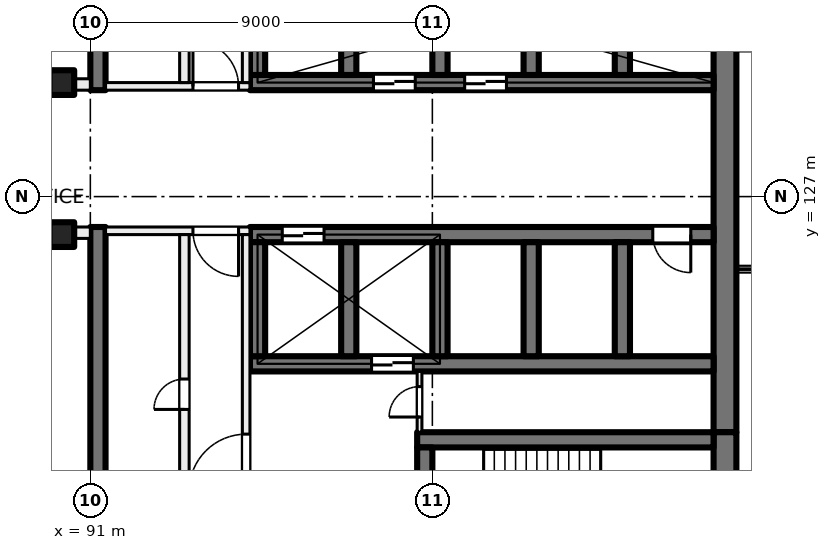
"""IFC4 building model, lengths in metres.
Left out: names, types, materials, properties, quantities, classifications, styles, units other than length and angle.
Written with IfcOpenShell. Run it as: python <this file> out.ifc"""

import sys

from ifc_helpers import new_model, si_unit, direction, frame, frame_2d, origin, origin_2d, place, context, subcontext, project, spatial, rectangle, extrude, element, fill, save


model = new_model("IFC4")
c1 = context("Model", 3, precision=1e-05, world=origin(), true_north=direction((0.0, 1.0)))
c2 = subcontext(c1, "Body", "Model", "MODEL_VIEW")
j1 = project(units=[si_unit("LENGTHUNIT", "METRE"), si_unit("PLANEANGLEUNIT", "RADIAN")], contexts=[c1])
p1 = place(None, origin())
s1 = spatial("IfcSite", under=j1, at=p1, CompositionType="ELEMENT")
p2 = place(p1, origin())
s2 = spatial("IfcBuilding", under=s1, at=p2, CompositionType="ELEMENT")
p3 = place(p2, frame((0.0, 0.0, 117.0)))
s3 = spatial("IfcBuildingStorey", under=s2, at=p3, CompositionType="ELEMENT", Elevation=117.0)
for number, where, z_axis, x_axis in (
    (1, (90.25, 130.0, 0.0), (0.0, 0.0, 1.0), (1.0, 0.0, 0.0)),
    (2, (90.25, 126.0, 0.0), (0.0, 0.0, 1.0), (1.0, 0.0, 0.0)),
):
    element("IfcColumn", number, at=place(p3, frame(where, z_axis=z_axis, x_axis=x_axis)), inside=s3, PredefinedType="COLUMN", context=c2, shape_type="SweptSolid", body=[
        extrude(rectangle(XDim=0.65, YDim=0.65, at=origin_2d()), origin(), (0.0, 0.0, 1.0), 4.0),
    ])
p4 = place(p3, frame((107.7, 135.2, 0.0), z_axis=(0.0, 0.0, 1.0), x_axis=(0.0, -1.0, 0.0)))
e3 = element("IfcWall", 3, at=p4, inside=s3, PredefinedType="SHEAR", context=c2, shape_type="SweptSolid", body=[
    extrude(rectangle(XDim=14.4, YDim=0.6, at=frame_2d((7.2, 0.0))), origin(), (0.0, 0.0, 1.0), 4.0),
])
p5 = place(p3, frame((107.7, 120.8, 0.0), z_axis=(0.0, 0.0, 1.0), x_axis=(0.0, -1.0, 0.0)))
e4 = element("IfcWall", 4, at=p5, inside=s3, PredefinedType="SHEAR", context=c2, shape_type="SweptSolid", body=[
    extrude(rectangle(XDim=3.8, YDim=0.6, at=frame_2d((1.9, 0.0))), origin(), (0.0, 0.0, 1.0), 4.0),
])
p6 = place(p3, frame((107.4, 120.6, 0.0), z_axis=(0.0, 0.0, 1.0), x_axis=(-1.0, 0.0, 0.0)))
e5 = element("IfcWall", 5, at=p6, inside=s3, PredefinedType="SHEAR", context=c2, shape_type="SweptSolid", body=[
    extrude(rectangle(XDim=7.8, YDim=0.4, at=frame_2d((3.9, 0.0))), origin(), (0.0, 0.0, 1.0), 4.0),
])
p7 = place(p3, frame((99.8, 120.4, 0.0), z_axis=(0.0, 0.0, 1.0), x_axis=(0.0, -1.0, 0.0)))
e6 = element("IfcWall", 6, at=p7, inside=s3, PredefinedType="SHEAR", context=c2, shape_type="SweptSolid", body=[
    extrude(rectangle(XDim=2.8, YDim=0.4, at=frame_2d((1.4, 0.0))), origin(), (0.0, 0.0, 1.0), 4.0),
])
p8 = place(p7, frame((0.9, 0.0, 0.0)))
e7 = element("IfcOpeningElement", 7, at=p8, cuts=e6, PredefinedType="OPENING", context=c2, shape_type="SweptSolid", body=[
    extrude(rectangle(XDim=1.0, YDim=2.1, at=frame_2d((0.5, 1.05))), frame((0.0, 0.21, 0.0), z_axis=(0.0, -1.0, 0.0), x_axis=(1.0, 0.0, 0.0)), (0.0, 0.0, 1.0), 0.42),
])
p9 = place(p3, frame((107.4, 130.0, 0.0), z_axis=(0.0, 0.0, 1.0), x_axis=(-1.0, 0.0, 0.0)))
e8 = element("IfcWall", 8, at=p9, inside=s3, PredefinedType="SHEAR", context=c2, shape_type="SweptSolid", body=[
    extrude(rectangle(XDim=12.2, YDim=0.4, at=frame_2d((6.1, 0.0))), origin(), (0.0, 0.0, 1.0), 4.0),
])
p10 = place(p9, frame((5.45, 0.0, 0.0)))
e9 = element("IfcOpeningElement", 9, at=p10, cuts=e8, PredefinedType="OPENING", context=c2, shape_type="SweptSolid", body=[
    extrude(rectangle(XDim=1.1, YDim=2.1, at=frame_2d((0.55, 1.05))), frame((0.0, 0.21, 0.0), z_axis=(0.0, -1.0, 0.0), x_axis=(1.0, 0.0, 0.0)), (0.0, 0.0, 1.0), 0.42),
])
p11 = place(p9, frame((7.85, 0.0, 0.0)))
e10 = element("IfcOpeningElement", 10, at=p11, cuts=e8, PredefinedType="OPENING", context=c2, shape_type="SweptSolid", body=[
    extrude(rectangle(XDim=1.1, YDim=2.1, at=frame_2d((0.55, 1.05))), frame((0.0, 0.21, 0.0), z_axis=(0.0, -1.0, 0.0), x_axis=(1.0, 0.0, 0.0)), (0.0, 0.0, 1.0), 0.42),
])
for number, where, z_axis, x_axis in (
    (11, (105.0, 133.2, 0.0), (0.0, 0.0, 1.0), (0.0, -1.0, 0.0)),
    (12, (102.6, 133.2, 0.0), (0.0, 0.0, 1.0), (0.0, -1.0, 0.0)),
    (13, (100.2, 133.2, 0.0), (0.0, 0.0, 1.0), (0.0, -1.0, 0.0)),
    (14, (97.8, 133.2, 0.0), (0.0, 0.0, 1.0), (0.0, -1.0, 0.0)),
    (15, (95.4, 133.2, 0.0), (0.0, 0.0, 1.0), (0.0, -1.0, 0.0)),
):
    element("IfcWall", number, at=place(p3, frame(where, z_axis=z_axis, x_axis=x_axis)), inside=s3, PredefinedType="SHEAR", context=c2, shape_type="SweptSolid", body=[
        extrude(rectangle(XDim=3.0, YDim=0.4, at=frame_2d((1.5, 0.0))), origin(), (0.0, 0.0, 1.0), 4.0),
    ])
p12 = place(p3, frame((107.4, 126.0, 0.0), z_axis=(0.0, 0.0, 1.0), x_axis=(-1.0, 0.0, 0.0)))
e16 = element("IfcWall", 16, at=p12, inside=s3, PredefinedType="SHEAR", context=c2, shape_type="SweptSolid", body=[
    extrude(rectangle(XDim=12.2, YDim=0.4, at=frame_2d((6.1, 0.0))), origin(), (0.0, 0.0, 1.0), 4.0),
])
p13 = place(p12, frame((10.25, 0.0, 0.0)))
e17 = element("IfcOpeningElement", 17, at=p13, cuts=e16, PredefinedType="OPENING", context=c2, shape_type="SweptSolid", body=[
    extrude(rectangle(XDim=1.1, YDim=2.1, at=frame_2d((0.55, 1.05))), frame((0.0, 0.21, 0.0), z_axis=(0.0, -1.0, 0.0), x_axis=(1.0, 0.0, 0.0)), (0.0, 0.0, 1.0), 0.42),
])
p14 = place(p12, frame((0.6, 0.0, 0.0)))
e18 = element("IfcOpeningElement", 18, at=p14, cuts=e16, PredefinedType="OPENING", context=c2, shape_type="SweptSolid", body=[
    extrude(rectangle(XDim=1.0, YDim=2.1, at=frame_2d((0.5, 1.05))), frame((0.0, 0.21, 0.0), z_axis=(0.0, -1.0, 0.0), x_axis=(1.0, 0.0, 0.0)), (0.0, 0.0, 1.0), 0.42),
])
p15 = place(p3, frame((107.4, 122.6, 0.0), z_axis=(0.0, 0.0, 1.0), x_axis=(-1.0, 0.0, 0.0)))
e19 = element("IfcWall", 19, at=p15, inside=s3, PredefinedType="SHEAR", context=c2, shape_type="SweptSolid", body=[
    extrude(rectangle(XDim=12.2, YDim=0.4, at=frame_2d((6.1, 0.0))), origin(), (0.0, 0.0, 1.0), 4.0),
])
p16 = place(p15, frame((7.9, 0.0, 0.0)))
e20 = element("IfcOpeningElement", 20, at=p16, cuts=e19, PredefinedType="OPENING", context=c2, shape_type="SweptSolid", body=[
    extrude(rectangle(XDim=1.1, YDim=2.1, at=frame_2d((0.55, 1.05))), frame((0.0, 0.21, 0.0), z_axis=(0.0, -1.0, 0.0), x_axis=(1.0, 0.0, 0.0)), (0.0, 0.0, 1.0), 0.42),
])
for number, where, z_axis, x_axis in (
    (21, (105.0, 125.8, 0.0), (0.0, 0.0, 1.0), (0.0, -1.0, 0.0)),
    (22, (102.6, 125.8, 0.0), (0.0, 0.0, 1.0), (0.0, -1.0, 0.0)),
    (23, (100.2, 125.8, 0.0), (0.0, 0.0, 1.0), (0.0, -1.0, 0.0)),
    (24, (97.8, 125.8, 0.0), (0.0, 0.0, 1.0), (0.0, -1.0, 0.0)),
    (25, (95.4, 125.8, 0.0), (0.0, 0.0, 1.0), (0.0, -1.0, 0.0)),
):
    element("IfcWall", number, at=place(p3, frame(where, z_axis=z_axis, x_axis=x_axis)), inside=s3, PredefinedType="SHEAR", context=c2, shape_type="SweptSolid", body=[
        extrude(rectangle(XDim=3.0, YDim=0.4, at=frame_2d((1.5, 0.0))), origin(), (0.0, 0.0, 1.0), 4.0),
    ])
for number, where, z_axis, x_axis in (
    (26, (91.2, 138.4, 0.0), (0.0, 0.0, 1.0), (0.0, -1.0, 0.0)),
    (27, (91.2, 126.2, 0.0), (0.0, 0.0, 1.0), (0.0, -1.0, 0.0)),
):
    element("IfcWall", number, at=place(p3, frame(where, z_axis=z_axis, x_axis=x_axis)), inside=s3, PredefinedType="SHEAR", context=c2, shape_type="SweptSolid", body=[
        extrude(rectangle(XDim=8.6, YDim=0.4, at=frame_2d((4.3, 0.0))), origin(), (0.0, 0.0, 1.0), 4.0),
    ])
p17 = place(p3, frame((95.2, 126.1, 0.0), z_axis=(0.0, 0.0, 1.0), x_axis=(-1.0, 0.0, 0.0)))
e28 = element("IfcWall", 28, at=p17, inside=s3, PredefinedType="PARTITIONING", context=c2, shape_type="SweptSolid", body=[
    extrude(rectangle(XDim=3.8, YDim=0.2, at=frame_2d((1.9, 0.0))), origin(), (0.0, 0.0, 1.0), 3.625),
])
p18 = place(p17, frame((0.3, 0.0, 0.0)))
e29 = element("IfcOpeningElement", 29, at=p18, cuts=e28, PredefinedType="OPENING", context=c2, shape_type="SweptSolid", body=[
    extrude(rectangle(XDim=1.2, YDim=2.1, at=frame_2d((0.6, 1.05))), frame((0.0, 0.11, 0.0), z_axis=(0.0, -1.0, 0.0), x_axis=(1.0, 0.0, 0.0)), (0.0, 0.0, 1.0), 0.22),
])
p19 = place(p3, frame((95.1, 117.6, 0.0), z_axis=(0.0, 0.0, 1.0), x_axis=(0.0, 1.0, 0.0)))
e30 = element("IfcWall", 30, at=p19, inside=s3, PredefinedType="PARTITIONING", context=c2, shape_type="SweptSolid", body=[
    extrude(rectangle(XDim=8.4, YDim=0.2, at=frame_2d((4.2, 0.0))), origin(), (0.0, 0.0, 1.0), 3.625),
])
p20 = place(p19, frame((1.65, 0.0, 0.0)))
e31 = element("IfcOpeningElement", 31, at=p20, cuts=e30, PredefinedType="OPENING", context=c2, shape_type="SweptSolid", body=[
    extrude(rectangle(XDim=1.5, YDim=2.1, at=frame_2d((0.75, 1.05))), frame((0.0, 0.11, 0.0), z_axis=(0.0, -1.0, 0.0), x_axis=(1.0, 0.0, 0.0)), (0.0, 0.0, 1.0), 0.22),
])
p21 = place(p3, frame((93.475, 117.6, 0.0), z_axis=(0.0, 0.0, 1.0), x_axis=(0.0, 1.0, 0.0)))
e32 = element("IfcWall", 32, at=p21, inside=s3, PredefinedType="PARTITIONING", context=c2, shape_type="SweptSolid", body=[
    extrude(rectangle(XDim=8.4, YDim=0.25, at=frame_2d((4.2, 0.0))), origin(), (0.0, 0.0, 1.0), 3.625),
])
p22 = place(p21, frame((3.8, 0.0, 0.0)))
e33 = element("IfcOpeningElement", 33, at=p22, cuts=e32, PredefinedType="OPENING", context=c2, shape_type="SweptSolid", body=[
    extrude(rectangle(XDim=0.8, YDim=2.1, at=frame_2d((0.4, 1.05))), frame((0.0, 0.135, 0.0), z_axis=(0.0, -1.0, 0.0), x_axis=(1.0, 0.0, 0.0)), (0.0, 0.0, 1.0), 0.27),
])
p23 = place(p3, frame((99.663, 120.8, 0.0), z_axis=(0.0, 0.0, 1.0), x_axis=(0.0, 1.0, 0.0)))
e34 = element("IfcWall", 34, at=p23, inside=s3, PredefinedType="PARTITIONING", context=c2, shape_type="SweptSolid", body=[
    extrude(rectangle(XDim=1.6, YDim=0.125, at=frame_2d((0.8, 0.0))), origin(), (0.0, 0.0, 1.0), 3.625),
])
p24 = place(p23, frame((0.4, 0.0, 0.0)))
e35 = element("IfcOpeningElement", 35, at=p24, cuts=e34, PredefinedType="OPENING", context=c2, shape_type="SweptSolid", body=[
    extrude(rectangle(XDim=0.8, YDim=2.1, at=frame_2d((0.4, 1.05))), frame((0.0, 0.073, 0.0), z_axis=(0.0, -1.0, 0.0), x_axis=(1.0, 0.0, 0.0)), (0.0, 0.0, 1.0), 0.145),
])
p25 = place(p3, frame((91.4, 129.9, 0.0), z_axis=(0.0, 0.0, 1.0), x_axis=(1.0, 0.0, 0.0)))
e36 = element("IfcWall", 36, at=p25, inside=s3, PredefinedType="PARTITIONING", context=c2, shape_type="SweptSolid", body=[
    extrude(rectangle(XDim=3.8, YDim=0.2, at=frame_2d((1.9, 0.0))), origin(), (0.0, 0.0, 1.0), 3.625),
])
p26 = place(p25, frame((2.3, 0.0, 0.0)))
e37 = element("IfcOpeningElement", 37, at=p26, cuts=e36, PredefinedType="OPENING", context=c2, shape_type="SweptSolid", body=[
    extrude(rectangle(XDim=1.2, YDim=2.1, at=frame_2d((0.6, 1.05))), frame((0.0, 0.11, 0.0), z_axis=(0.0, -1.0, 0.0), x_axis=(1.0, 0.0, 0.0)), (0.0, 0.0, 1.0), 0.22),
])
p27 = place(p3, frame((95.1, 130.0, 0.0), z_axis=(0.0, 0.0, 1.0), x_axis=(0.0, 1.0, 0.0)))
e38 = element("IfcWall", 38, at=p27, inside=s3, PredefinedType="PARTITIONING", context=c2, shape_type="SweptSolid", body=[
    extrude(rectangle(XDim=8.4, YDim=0.2, at=frame_2d((4.2, 0.0))), origin(), (0.0, 0.0, 1.0), 3.625),
])
p28 = place(p27, frame((5.25, 0.0, 0.0)))
e39 = element("IfcOpeningElement", 39, at=p28, cuts=e38, PredefinedType="OPENING", context=c2, shape_type="SweptSolid", body=[
    extrude(rectangle(XDim=1.5, YDim=2.1, at=frame_2d((0.75, 1.05))), frame((0.0, 0.11, 0.0), z_axis=(0.0, -1.0, 0.0), x_axis=(1.0, 0.0, 0.0)), (0.0, 0.0, 1.0), 0.22),
])
p29 = place(p3, frame((93.475, 130.0, 0.0), z_axis=(0.0, 0.0, 1.0), x_axis=(0.0, 1.0, 0.0)))
e40 = element("IfcWall", 40, at=p29, inside=s3, PredefinedType="PARTITIONING", context=c2, shape_type="SweptSolid", body=[
    extrude(rectangle(XDim=8.4, YDim=0.25, at=frame_2d((4.2, 0.0))), origin(), (0.0, 0.0, 1.0), 3.625),
])
p30 = place(p29, frame((0.875, 0.0, 0.0)))
e41 = element("IfcOpeningElement", 41, at=p30, cuts=e40, PredefinedType="OPENING", context=c2, shape_type="SweptSolid", body=[
    extrude(rectangle(XDim=1.0, YDim=2.1, at=frame_2d((0.5, 1.05))), frame((0.0, 0.135, 0.0), z_axis=(0.0, -1.0, 0.0), x_axis=(1.0, 0.0, 0.0)), (0.0, 0.0, 1.0), 0.27),
])
p31 = place(p29, frame((5.225, 0.0, 0.0)))
e42 = element("IfcOpeningElement", 42, at=p31, cuts=e40, PredefinedType="OPENING", context=c2, shape_type="SweptSolid", body=[
    extrude(rectangle(XDim=0.8, YDim=2.1, at=frame_2d((0.4, 1.05))), frame((0.0, 0.135, 0.0), z_axis=(0.0, -1.0, 0.0), x_axis=(1.0, 0.0, 0.0)), (0.0, 0.0, 1.0), 0.27),
])
p32 = place(p3, frame((72.5, 129.95, 0.0), z_axis=(0.0, 0.0, 1.0), x_axis=(1.0, 0.0, 0.0)))
e43 = element("IfcWall", 43, at=p32, inside=s3, PredefinedType="PARTITIONING", context=c2, shape_type="SweptSolid", body=[
    extrude(rectangle(XDim=18.5, YDim=0.3, at=frame_2d((9.25, 0.0))), origin(), (0.0, 0.0, 1.0), 3.625),
])
p33 = place(p32, frame((15.375, 0.0, 0.0)))
e44 = element("IfcOpeningElement", 44, at=p33, cuts=e43, PredefinedType="OPENING", context=c2, shape_type="SweptSolid", body=[
    extrude(rectangle(XDim=1.0, YDim=2.1, at=frame_2d((0.5, 1.05))), frame((0.0, 0.16, 0.0), z_axis=(0.0, -1.0, 0.0), x_axis=(1.0, 0.0, 0.0)), (0.0, 0.0, 1.0), 0.32),
])
p34 = place(p32, frame((10.5, 0.0, 0.0)))
e45 = element("IfcOpeningElement", 45, at=p34, cuts=e43, PredefinedType="OPENING", context=c2, shape_type="SweptSolid", body=[
    extrude(rectangle(XDim=1.0, YDim=2.1, at=frame_2d((0.5, 1.05))), frame((0.0, 0.16, 0.0), z_axis=(0.0, -1.0, 0.0), x_axis=(1.0, 0.0, 0.0)), (0.0, 0.0, 1.0), 0.32),
])
p35 = place(p32, frame((3.475, 0.0, 0.0)))
e46 = element("IfcOpeningElement", 46, at=p35, cuts=e43, PredefinedType="OPENING", context=c2, shape_type="SweptSolid", body=[
    extrude(rectangle(XDim=1.8, YDim=2.1, at=frame_2d((0.9, 1.05))), frame((0.0, 0.16, 0.0), z_axis=(0.0, -1.0, 0.0), x_axis=(1.0, 0.0, 0.0)), (0.0, 0.0, 1.0), 0.32),
])
p36 = place(p3, frame((91.0, 126.05, 0.0), z_axis=(0.0, 0.0, 1.0), x_axis=(-1.0, 0.0, 0.0)))
e47 = element("IfcWall", 47, at=p36, inside=s3, PredefinedType="PARTITIONING", context=c2, shape_type="SweptSolid", body=[
    extrude(rectangle(XDim=43.785, YDim=0.3, at=frame_2d((21.893, 0.0))), origin(), (0.0, 0.0, 1.0), 3.625),
])
p37 = place(p36, frame((7.0, 0.0, 0.0)))
e48 = element("IfcOpeningElement", 48, at=p37, cuts=e47, PredefinedType="OPENING", context=c2, shape_type="SweptSolid", body=[
    extrude(rectangle(XDim=1.0, YDim=2.1, at=frame_2d((0.5, 1.05))), frame((0.0, 0.16, 0.0), z_axis=(0.0, -1.0, 0.0), x_axis=(1.0, 0.0, 0.0)), (0.0, 0.0, 1.0), 0.32),
])
p38 = place(p36, frame((15.6, 0.0, 0.0)))
e49 = element("IfcOpeningElement", 49, at=p38, cuts=e47, PredefinedType="OPENING", context=c2, shape_type="SweptSolid", body=[
    extrude(rectangle(XDim=1.8, YDim=2.1, at=frame_2d((0.9, 1.05))), frame((0.0, 0.16, 0.0), z_axis=(0.0, -1.0, 0.0), x_axis=(1.0, 0.0, 0.0)), (0.0, 0.0, 1.0), 0.32),
])
p39 = place(p36, frame((34.0, 0.0, 0.0)))
e50 = element("IfcOpeningElement", 50, at=p39, cuts=e47, PredefinedType="OPENING", context=c2, shape_type="SweptSolid", body=[
    extrude(rectangle(XDim=1.0, YDim=2.1, at=frame_2d((0.5, 1.05))), frame((0.0, 0.16, 0.0), z_axis=(0.0, -1.0, 0.0), x_axis=(1.0, 0.0, 0.0)), (0.0, 0.0, 1.0), 0.32),
])
p40 = place(p36, frame((39.296, 0.0, 0.0)))
e51 = element("IfcOpeningElement", 51, at=p40, cuts=e47, PredefinedType="OPENING", context=c2, shape_type="SweptSolid", body=[
    extrude(rectangle(XDim=1.8, YDim=2.1, at=frame_2d((0.9, 1.05))), frame((0.0, 0.16, 0.0), z_axis=(0.0, -1.0, 0.0), x_axis=(1.0, 0.0, 0.0)), (0.0, 0.0, 1.0), 0.32),
])
p41 = place(p13, origin())
e52 = element("IfcDoor", 52, at=p41, inside=s3, OperationType="DOUBLE_DOOR_SLIDING", PredefinedType="DOOR", context=c2, shape_type="SweptSolid", body=[
    extrude(rectangle(XDim=1.1, YDim=2.1, at=frame_2d((0.55, 1.05))), frame((0.0, 0.025, 0.0), z_axis=(0.0, -1.0, 0.0), x_axis=(1.0, 0.0, 0.0)), (0.0, 0.0, 1.0), 0.05),
])
fill(e17, e52)
p42 = place(p10, origin())
e53 = element("IfcDoor", 53, at=p42, inside=s3, OperationType="DOUBLE_DOOR_SLIDING", PredefinedType="DOOR", context=c2, shape_type="SweptSolid", body=[
    extrude(rectangle(XDim=1.1, YDim=2.1, at=frame_2d((0.55, 1.05))), frame((0.0, 0.025, 0.0), z_axis=(0.0, -1.0, 0.0), x_axis=(1.0, 0.0, 0.0)), (0.0, 0.0, 1.0), 0.05),
])
fill(e9, e53)
p43 = place(p11, origin())
e54 = element("IfcDoor", 54, at=p43, inside=s3, OperationType="DOUBLE_DOOR_SLIDING", PredefinedType="DOOR", context=c2, shape_type="SweptSolid", body=[
    extrude(rectangle(XDim=1.1, YDim=2.1, at=frame_2d((0.55, 1.05))), frame((0.0, 0.025, 0.0), z_axis=(0.0, -1.0, 0.0), x_axis=(1.0, 0.0, 0.0)), (0.0, 0.0, 1.0), 0.05),
])
fill(e10, e54)
p44 = place(p14, origin())
e55 = element("IfcDoor", 55, at=p44, inside=s3, OperationType="SINGLE_SWING_LEFT", PredefinedType="DOOR", context=c2, shape_type="SweptSolid", body=[
    extrude(rectangle(XDim=1.0, YDim=2.1, at=frame_2d((0.5, 1.05))), frame((0.0, 0.025, 0.0), z_axis=(0.0, -1.0, 0.0), x_axis=(1.0, 0.0, 0.0)), (0.0, 0.0, 1.0), 0.05),
])
fill(e18, e55)
p45 = place(p18, origin())
e56 = element("IfcDoor", 56, at=p45, inside=s3, OperationType="DOUBLE_DOOR_SINGLE_SWING", PredefinedType="DOOR", context=c2, shape_type="SweptSolid", body=[
    extrude(rectangle(XDim=1.2, YDim=2.1, at=frame_2d((0.6, 1.05))), frame((0.0, 0.025, 0.0), z_axis=(0.0, -1.0, 0.0), x_axis=(1.0, 0.0, 0.0)), (0.0, 0.0, 1.0), 0.05),
])
fill(e29, e56)
p46 = place(p20, origin())
e57 = element("IfcDoor", 57, at=p46, inside=s3, OperationType="DOUBLE_DOOR_SINGLE_SWING", PredefinedType="DOOR", context=c2, shape_type="SweptSolid", body=[
    extrude(rectangle(XDim=1.5, YDim=2.1, at=frame_2d((0.75, 1.05))), frame((0.0, 0.025, 0.0), z_axis=(0.0, -1.0, 0.0), x_axis=(1.0, 0.0, 0.0)), (0.0, 0.0, 1.0), 0.05),
])
fill(e31, e57)
p47 = place(p24, origin())
e58 = element("IfcDoor", 58, at=p47, inside=s3, OperationType="SINGLE_SWING_RIGHT", PredefinedType="DOOR", context=c2, shape_type="SweptSolid", body=[
    extrude(rectangle(XDim=0.8, YDim=2.1, at=frame_2d((0.4, 1.05))), frame((0.0, 0.025, 0.0), z_axis=(0.0, -1.0, 0.0), x_axis=(1.0, 0.0, 0.0)), (0.0, 0.0, 1.0), 0.05),
])
fill(e35, e58)
p48 = place(p22, origin())
e59 = element("IfcDoor", 59, at=p48, inside=s3, OperationType="SINGLE_SWING_LEFT", PredefinedType="DOOR", context=c2, shape_type="SweptSolid", body=[
    extrude(rectangle(XDim=0.8, YDim=2.1, at=frame_2d((0.4, 1.05))), frame((0.0, 0.025, 0.0), z_axis=(0.0, -1.0, 0.0), x_axis=(1.0, 0.0, 0.0)), (0.0, 0.0, 1.0), 0.05),
])
fill(e33, e59)
p49 = place(p26, origin())
e60 = element("IfcDoor", 60, at=p49, inside=s3, OperationType="DOUBLE_DOOR_SINGLE_SWING", PredefinedType="DOOR", context=c2, shape_type="SweptSolid", body=[
    extrude(rectangle(XDim=1.2, YDim=2.1, at=frame_2d((0.6, 1.05))), frame((0.0, 0.025, 0.0), z_axis=(0.0, -1.0, 0.0), x_axis=(1.0, 0.0, 0.0)), (0.0, 0.0, 1.0), 0.05),
])
fill(e37, e60)
p50 = place(p16, origin())
e61 = element("IfcDoor", 61, at=p50, inside=s3, OperationType="DOUBLE_DOOR_SLIDING", PredefinedType="DOOR", context=c2, shape_type="SweptSolid", body=[
    extrude(rectangle(XDim=1.1, YDim=2.1, at=frame_2d((0.55, 1.05))), frame((0.0, 0.025, 0.0), z_axis=(0.0, -1.0, 0.0), x_axis=(1.0, 0.0, 0.0)), (0.0, 0.0, 1.0), 0.05),
])
fill(e20, e61)
save(model, sys.argv[1])
